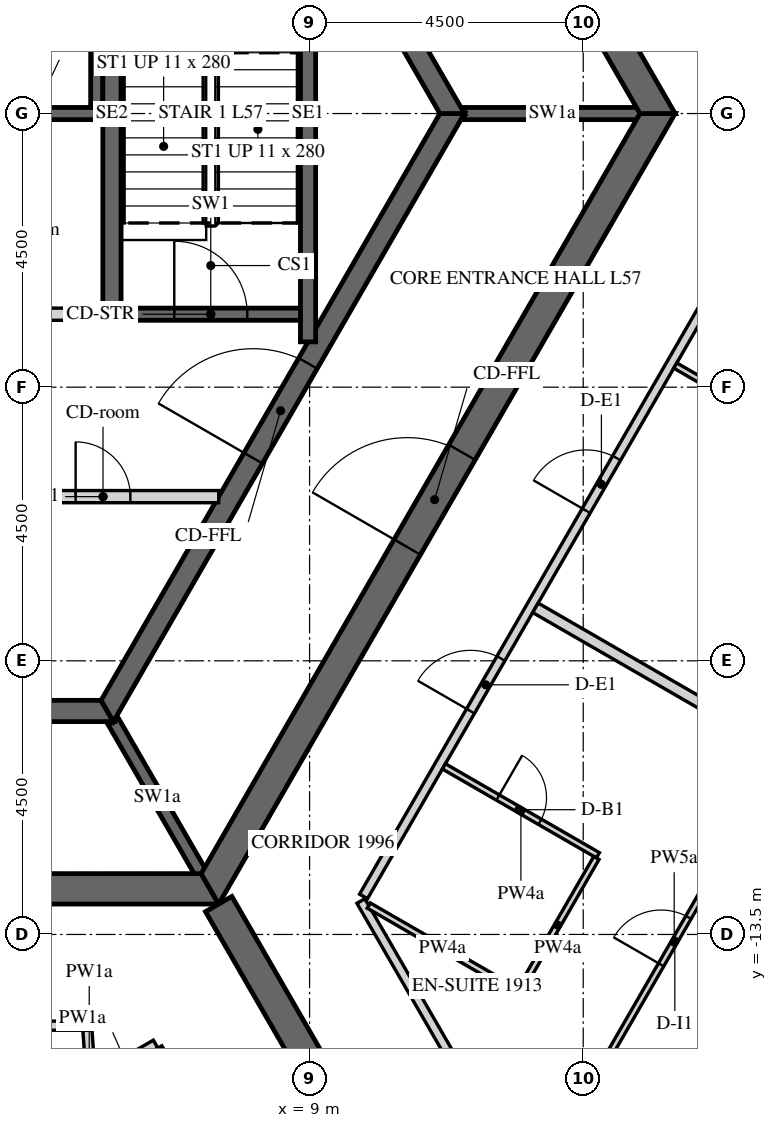
"""IFC4 building model, lengths in metres.
Left out: names, types, materials, properties, quantities, classifications, styles, units other than length and angle.
Written with IfcOpenShell. Run it as: python <this file> out.ifc"""

import sys

from ifc_helpers import new_model, si_unit, direction, frame, frame_2d, origin, place, context, subcontext, project, spatial, polyline, rectangle, outline, extrude, element, fill, save


model = new_model("IFC4")
c1 = context("Model", 3, precision=1e-05, world=origin(), true_north=direction((0.0, 1.0)))
c2 = subcontext(c1, "Body", "Model", "MODEL_VIEW")
j1 = project(units=[si_unit("LENGTHUNIT", "METRE"), si_unit("PLANEANGLEUNIT", "RADIAN")], contexts=[c1])
p1 = place(None, origin())
s1 = spatial("IfcSite", under=j1, at=p1, CompositionType="ELEMENT")
p2 = place(p1, origin())
s2 = spatial("IfcBuilding", under=s1, at=p2, CompositionType="ELEMENT")
p3 = place(p2, frame((0.0, 0.0, 238.5)))
s3 = spatial("IfcBuildingStorey", under=s2, at=p3, CompositionType="ELEMENT", Elevation=238.5)
p4 = place(p3, frame((-7.361, -12.75, -0.15), z_axis=(0.0, 0.0, 1.0), x_axis=(1.0, 0.0, 0.0)))
e1 = element("IfcWall", 1, at=p4, inside=s3, PredefinedType="SHEAR", context=c2, shape_type="SweptSolid", body=[
    extrude(outline(polyline([(-0.144, -0.25), (14.866, -0.25), (14.578, 0.25), (0.144, 0.25), (-0.144, -0.25)])), origin(), (0.0, 0.0, 1.0), 3.9),
])
p5 = place(p4, frame((6.761, 0.0, 0.15)))
e2 = element("IfcOpeningElement", 2, at=p5, cuts=e1, PredefinedType="OPENING", context=c2, shape_type="SweptSolid", body=[
    extrude(rectangle(XDim=1.2, YDim=2.4, at=frame_2d((0.6, 1.2))), frame((0.0, 0.26, 0.0), z_axis=(0.0, -1.0, 0.0), x_axis=(1.0, 0.0, 0.0)), (0.0, 0.0, 1.0), 0.52),
])
p6 = place(p3, frame((7.361, -12.75, -0.15), z_axis=(0.0, 0.0, 1.0), x_axis=(0.50000571537, 0.866022103989, 0.0)))
e3 = element("IfcWall", 3, at=p6, inside=s3, PredefinedType="SHEAR", context=c2, shape_type="SweptSolid", body=[
    extrude(outline(polyline([(-0.144, -0.25), (14.867, -0.25), (14.578, 0.25), (0.144, 0.25), (-0.144, -0.25)])), origin(), (0.0, 0.0, 1.0), 3.9),
])
p7 = place(p6, frame((6.49, 0.0, 0.15)))
e4 = element("IfcOpeningElement", 4, at=p7, cuts=e3, PredefinedType="OPENING", context=c2, shape_type="SweptSolid", body=[
    extrude(rectangle(XDim=1.8, YDim=2.4, at=frame_2d((0.9, 1.2))), frame((0.0, 0.26, 0.0), z_axis=(0.0, -1.0, 0.0), x_axis=(1.0, 0.0, 0.0)), (0.0, 0.0, 1.0), 0.52),
])
p8 = place(p3, frame((14.722, 0.0, -0.15), z_axis=(0.0, 0.0, 1.0), x_axis=(-0.50000571537, 0.866022103989, 0.0)))
e5 = element("IfcWall", 5, at=p8, inside=s3, PredefinedType="SHEAR", context=c2, shape_type="SweptSolid", body=[
    extrude(outline(polyline([(-0.144, -0.25), (14.867, -0.25), (14.578, 0.25), (0.144, 0.25), (-0.144, -0.25)])), origin(), (0.0, 0.0, 1.0), 3.9),
])
p9 = place(p8, frame((6.432, 0.0, 0.15)))
e6 = element("IfcOpeningElement", 6, at=p9, cuts=e5, PredefinedType="OPENING", context=c2, shape_type="SweptSolid", body=[
    extrude(rectangle(XDim=1.8, YDim=2.4, at=frame_2d((0.9, 1.2))), frame((0.0, 0.26, 0.0), z_axis=(0.0, -1.0, 0.0), x_axis=(1.0, 0.0, 0.0)), (0.0, 0.0, 1.0), 0.52),
])
p10 = place(p3, frame((7.506, -13.0, -0.15), z_axis=(0.0, 0.0, 1.0), x_axis=(0.499988271576, -0.866032175087, 0.0)))
e7 = element("IfcWall", 7, at=p10, inside=s3, PredefinedType="SHEAR", context=c2, shape_type="SweptSolid", body=[
    extrude(rectangle(XDim=15.424, YDim=0.5, at=frame_2d((7.712, 0.0))), origin(), (0.0, 0.0, 1.0), 3.9),
])
p11 = place(p10, frame((6.812, 0.0, 0.15)))
e8 = element("IfcOpeningElement", 8, at=p11, cuts=e7, PredefinedType="OPENING", context=c2, shape_type="SweptSolid", body=[
    extrude(rectangle(XDim=1.8, YDim=2.4, at=frame_2d((0.9, 1.2))), frame((0.0, 0.26, 0.0), z_axis=(0.0, -1.0, 0.0), x_axis=(1.0, 0.0, 0.0)), (0.0, 0.0, 1.0), 0.52),
])
p12 = place(p3, frame((-5.673, -9.825, -0.15), z_axis=(0.0, 0.0, 1.0), x_axis=(1.0, 0.0, 0.0)))
e9 = element("IfcWall", 9, at=p12, inside=s3, PredefinedType="SHEAR", context=c2, shape_type="SweptSolid", body=[
    extrude(outline(polyline([(-0.101, -0.175), (11.446, -0.175), (11.244, 0.175), (0.101, 0.175), (-0.101, -0.175)])), origin(), (0.0, 0.0, 1.0), 3.9),
])
p13 = place(p3, frame((5.673, -9.825, -0.15), z_axis=(0.0, 0.0, 1.0), x_axis=(0.499995046907, 0.866028263435, 0.0)))
e10 = element("IfcWall", 10, at=p13, inside=s3, PredefinedType="SHEAR", context=c2, shape_type="SweptSolid", body=[
    extrude(outline(polyline([(-0.101, -0.175), (11.446, -0.175), (11.244, 0.175), (0.101, 0.175), (-0.101, -0.175)])), origin(), (0.0, 0.0, 1.0), 3.9),
])
p14 = place(p13, frame((4.801, 0.0, 0.15)))
e11 = element("IfcOpeningElement", 11, at=p14, cuts=e10, PredefinedType="OPENING", context=c2, shape_type="SweptSolid", body=[
    extrude(rectangle(XDim=1.8, YDim=2.4, at=frame_2d((0.9, 1.2))), frame((0.0, 0.185, 0.0), z_axis=(0.0, -1.0, 0.0), x_axis=(1.0, 0.0, 0.0)), (0.0, 0.0, 1.0), 0.37),
])
p15 = place(p3, frame((11.345, 0.0, -0.15), z_axis=(0.0, 0.0, 1.0), x_axis=(-0.499995046907, 0.866028263435, 0.0)))
e12 = element("IfcWall", 12, at=p15, inside=s3, PredefinedType="SHEAR", context=c2, shape_type="SweptSolid", body=[
    extrude(outline(polyline([(-0.101, -0.175), (11.446, -0.175), (11.244, 0.175), (0.101, 0.175), (-0.101, -0.175)])), origin(), (0.0, 0.0, 1.0), 3.9),
])
p16 = place(p15, frame((4.744, 0.0, 0.15)))
e13 = element("IfcOpeningElement", 13, at=p16, cuts=e12, PredefinedType="OPENING", context=c2, shape_type="SweptSolid", body=[
    extrude(rectangle(XDim=1.8, YDim=2.4, at=frame_2d((0.9, 1.2))), frame((0.0, 0.185, 0.0), z_axis=(0.0, -1.0, 0.0), x_axis=(1.0, 0.0, 0.0)), (0.0, 0.0, 1.0), 0.37),
])
p17 = place(p3, frame((-5.6, 0.0, -0.25), z_axis=(0.0, 0.0, 1.0), x_axis=(1.0, 0.0, 0.0)))
e14 = element("IfcWall", 14, at=p17, inside=s3, PredefinedType="SHEAR", context=c2, shape_type="SweptSolid", body=[
    extrude(rectangle(XDim=11.2, YDim=0.2, at=frame_2d((5.6, 0.0))), origin(), (0.0, 0.0, 1.0), 3.9),
])
p18 = place(p3, frame((5.5, 0.1, -0.25), z_axis=(0.0, 0.0, 1.0), x_axis=(0.0, 1.0, 0.0)))
e15 = element("IfcWall", 15, at=p18, inside=s3, PredefinedType="SHEAR", context=c2, shape_type="SweptSolid", body=[
    extrude(rectangle(XDim=3.1, YDim=0.2, at=frame_2d((1.55, 0.0))), origin(), (0.0, 0.0, 1.0), 3.9),
])
p19 = place(p3, frame((2.75, -3.3, 0.0), z_axis=(0.0, 0.0, 1.0), x_axis=(1.0, 0.0, 0.0)))
e16 = element("IfcWall", 16, at=p19, inside=s3, PredefinedType="PARTITIONING", context=c2, shape_type="SweptSolid", body=[
    extrude(rectangle(XDim=2.85, YDim=0.2, at=frame_2d((1.425, 0.0))), origin(), (0.0, 0.0, 1.0), 3.65),
])
p20 = place(p19, frame((1.075, 0.0, 0.0)))
e17 = element("IfcOpeningElement", 17, at=p20, cuts=e16, PredefinedType="OPENING", context=c2, shape_type="SweptSolid", body=[
    extrude(rectangle(XDim=0.9, YDim=2.1, at=frame_2d((0.45, 1.05))), frame((0.0, 0.11, 0.0), z_axis=(0.0, -1.0, 0.0), x_axis=(1.0, 0.0, 0.0)), (0.0, 0.0, 1.0), 0.22),
])
p21 = place(p3, frame((3.7, -6.3, 0.0), z_axis=(0.0, 0.0, 1.0), x_axis=(1.0, 0.0, 0.0)))
e18 = element("IfcWall", 18, at=p21, inside=s3, PredefinedType="PARTITIONING", context=c2, shape_type="SweptSolid", body=[
    extrude(rectangle(XDim=3.806, YDim=0.2, at=frame_2d((1.903, 0.0))), origin(), (0.0, 0.0, 1.0), 3.65),
])
p22 = place(p21, frame((1.453, 0.0, 0.0)))
e19 = element("IfcOpeningElement", 19, at=p22, cuts=e18, PredefinedType="OPENING", context=c2, shape_type="SweptSolid", body=[
    extrude(rectangle(XDim=0.9, YDim=2.1, at=frame_2d((0.45, 1.05))), frame((0.0, 0.11, 0.0), z_axis=(0.0, -1.0, 0.0), x_axis=(1.0, 0.0, 0.0)), (0.0, 0.0, 1.0), 0.22),
])
for number, where, z_axis, x_axis in (
    (20, (11.547, 0.0, -0.15), (0.0, 0.0, 1.0), (1.0, 0.0, 0.0)),
    (21, (5.773, -10.0, -0.15), (0.0, 0.0, 1.0), (0.5, -0.866, 0.0)),
):
    element("IfcWall", number, at=place(p3, frame(where, z_axis=z_axis, x_axis=x_axis)), inside=s3, PredefinedType="SHEAR", context=c2, shape_type="SweptSolid", body=[
        extrude(rectangle(XDim=2.887, YDim=0.2, at=frame_2d((1.443, 0.0))), origin(), (0.0, 0.0, 1.0), 3.9),
    ])
p23 = place(p3, frame((5.75, -3.4, -0.25), z_axis=(0.0, 0.0, 1.0), x_axis=(0.0, 1.0, 0.0)))
e22 = element("IfcWall", 22, at=p23, inside=s3, PredefinedType="SHEAR", context=c2, shape_type="SweptSolid", body=[
    extrude(rectangle(XDim=6.8, YDim=0.3, at=frame_2d((3.4, 0.0))), origin(), (0.0, 0.0, 1.0), 3.9),
])
p24 = place(p3, frame((8.975, -3.755, -0.25), z_axis=(0.0, 0.0, 1.0), x_axis=(0.0, 1.0, 0.0)))
e23 = element("IfcWall", 23, at=p24, inside=s3, PredefinedType="SHEAR", context=c2, shape_type="SweptSolid", body=[
    extrude(rectangle(XDim=7.51, YDim=0.25, at=frame_2d((3.755, 0.0))), origin(), (0.0, 0.0, 1.0), 3.9),
])
p25 = place(p3, frame((5.9, -3.3, -0.25), z_axis=(0.0, 0.0, 1.0), x_axis=(1.0, 0.0, 0.0)))
e24 = element("IfcWall", 24, at=p25, inside=s3, PredefinedType="SHEAR", context=c2, shape_type="SweptSolid", body=[
    extrude(rectangle(XDim=2.95, YDim=0.2, at=frame_2d((1.475, 0.0))), origin(), (0.0, 0.0, 1.0), 3.9),
])
p26 = place(p25, frame((0.875, 0.0, 0.25)))
e25 = element("IfcOpeningElement", 25, at=p26, cuts=e24, PredefinedType="OPENING", context=c2, shape_type="SweptSolid", body=[
    extrude(rectangle(XDim=1.2, YDim=2.4, at=frame_2d((0.6, 1.2))), frame((0.0, 0.11, 0.0), z_axis=(0.0, -1.0, 0.0), x_axis=(1.0, 0.0, 0.0)), (0.0, 0.0, 1.0), 0.22),
])
p27 = place(p3, frame((-8.574, -15.0, 0.0), z_axis=(0.0, 0.0, 1.0), x_axis=(1.0, 0.0, 0.0)))
e26 = element("IfcWall", 26, at=p27, inside=s3, PredefinedType="PARTITIONING", context=c2, shape_type="SweptSolid", body=[
    extrude(rectangle(XDim=13.915, YDim=0.15, at=frame_2d((6.958, 0.0))), origin(), (0.0, 0.0, 1.0), 2.838),
])
p28 = place(p27, frame((1.001, 0.0, 0.0)))
e27 = element("IfcOpeningElement", 27, at=p28, cuts=e26, PredefinedType="OPENING", context=c2, shape_type="SweptSolid", body=[
    extrude(rectangle(XDim=1.0, YDim=2.1, at=frame_2d((0.5, 1.05))), frame((0.0, 0.085, 0.0), z_axis=(0.0, -1.0, 0.0), x_axis=(1.0, 0.0, 0.0)), (0.0, 0.0, 1.0), 0.17),
])
p29 = place(p27, frame((9.199, 0.0, 0.0)))
e28 = element("IfcOpeningElement", 28, at=p29, cuts=e26, PredefinedType="OPENING", context=c2, shape_type="SweptSolid", body=[
    extrude(rectangle(XDim=1.0, YDim=2.1, at=frame_2d((0.5, 1.05))), frame((0.0, 0.085, 0.0), z_axis=(0.0, -1.0, 0.0), x_axis=(1.0, 0.0, 0.0)), (0.0, 0.0, 1.0), 0.17),
])
p30 = place(p3, frame((5.347, -15.075, 0.0), z_axis=(0.0, 0.0, 1.0), x_axis=(0.069731635013, -0.997565786842, 0.0)))
e29 = element("IfcWall", 29, at=p30, inside=s3, PredefinedType="PARTITIONING", context=c2, shape_type="SweptSolid", body=[
    extrude(rectangle(XDim=0.847, YDim=0.15, at=frame_2d((0.424, 0.0))), origin(), (0.0, 0.0, 1.0), 2.838),
])
p31 = place(p3, frame((6.506, -15.368, 0.0), z_axis=(0.0, 0.0, 1.0), x_axis=(0.499995202058, -0.86602817386, 0.0)))
e30 = element("IfcWall", 30, at=p31, inside=s3, PredefinedType="PARTITIONING", context=c2, shape_type="SweptSolid", body=[
    extrude(rectangle(XDim=7.361, YDim=0.15, at=frame_2d((3.68, 0.0))), origin(), (0.0, 0.0, 1.0), 2.838),
])
p32 = place(p31, frame((4.368, 0.0, 0.0)))
e31 = element("IfcOpeningElement", 31, at=p32, cuts=e30, PredefinedType="OPENING", context=c2, shape_type="SweptSolid", body=[
    extrude(rectangle(XDim=1.0, YDim=2.1, at=frame_2d((0.5, 1.05))), frame((0.0, 0.085, 0.0), z_axis=(0.0, -1.0, 0.0), x_axis=(1.0, 0.0, 0.0)), (0.0, 0.0, 1.0), 0.17),
])
p33 = place(p3, frame((5.478, -15.875, 0.0), z_axis=(0.0, 0.0, 1.0), x_axis=(0.866000689289, 0.500042804318, 0.0)))
e32 = element("IfcWall", 32, at=p33, inside=s3, PredefinedType="PARTITIONING", context=c2, shape_type="SweptSolid", body=[
    extrude(rectangle(XDim=1.144, YDim=0.15, at=frame_2d((0.572, 0.0))), origin(), (0.0, 0.0, 1.0), 2.838),
])
p34 = place(p3, frame((13.699, -19.628, 0.0), z_axis=(0.0, 0.0, 1.0), x_axis=(-0.499993780622, 0.866028994514, 0.0)))
e33 = element("IfcWall", 33, at=p34, inside=s3, PredefinedType="PARTITIONING", context=c2, shape_type="SweptSolid", body=[
    extrude(rectangle(XDim=7.711, YDim=0.15, at=frame_2d((3.855, 0.0))), origin(), (0.0, 0.0, 1.0), 2.838),
])
p35 = place(p3, frame((9.887, -12.875, 0.0), z_axis=(0.0, 0.0, 1.0), x_axis=(0.499998228944, 0.866026426302, 0.0)))
e34 = element("IfcWall", 34, at=p35, inside=s3, PredefinedType="PARTITIONING", context=c2, shape_type="SweptSolid", body=[
    extrude(rectangle(XDim=14.867, YDim=0.15, at=frame_2d((7.433, 0.0))), origin(), (0.0, 0.0, 1.0), 2.838),
])
p36 = place(p35, frame((3.519, 0.0, 0.0)))
e35 = element("IfcOpeningElement", 35, at=p36, cuts=e34, PredefinedType="OPENING", context=c2, shape_type="SweptSolid", body=[
    extrude(rectangle(XDim=1.0, YDim=2.1, at=frame_2d((0.5, 1.05))), frame((0.0, 0.085, 0.0), z_axis=(0.0, -1.0, 0.0), x_axis=(1.0, 0.0, 0.0)), (0.0, 0.0, 1.0), 0.17),
])
p37 = place(p35, frame((7.324, 0.0, 0.0)))
e36 = element("IfcOpeningElement", 36, at=p37, cuts=e34, PredefinedType="OPENING", context=c2, shape_type="SweptSolid", body=[
    extrude(rectangle(XDim=1.0, YDim=2.1, at=frame_2d((0.5, 1.05))), frame((0.0, 0.085, 0.0), z_axis=(0.0, -1.0, 0.0), x_axis=(1.0, 0.0, 0.0)), (0.0, 0.0, 1.0), 0.17),
])
p38 = place(p35, frame((13.717, 0.0, 0.0)))
e37 = element("IfcOpeningElement", 37, at=p38, cuts=e34, PredefinedType="OPENING", context=c2, shape_type="SweptSolid", body=[
    extrude(rectangle(XDim=1.0, YDim=2.1, at=frame_2d((0.5, 1.05))), frame((0.0, 0.085, 0.0), z_axis=(0.0, -1.0, 0.0), x_axis=(1.0, 0.0, 0.0)), (0.0, 0.0, 1.0), 0.17),
])
p39 = place(p3, frame((17.277, 0.075, 0.0), z_axis=(0.0, 0.0, 1.0), x_axis=(-0.499998228944, 0.866026426302, 0.0)))
e38 = element("IfcWall", 38, at=p39, inside=s3, PredefinedType="PARTITIONING", context=c2, shape_type="SweptSolid", body=[
    extrude(rectangle(XDim=14.867, YDim=0.15, at=frame_2d((7.433, 0.0))), origin(), (0.0, 0.0, 1.0), 2.838),
])
p40 = place(p39, frame((4.345, 0.0, 0.0)))
e39 = element("IfcOpeningElement", 39, at=p40, cuts=e38, PredefinedType="OPENING", context=c2, shape_type="SweptSolid", body=[
    extrude(rectangle(XDim=1.0, YDim=2.1, at=frame_2d((0.5, 1.05))), frame((0.0, 0.085, 0.0), z_axis=(0.0, -1.0, 0.0), x_axis=(1.0, 0.0, 0.0)), (0.0, 0.0, 1.0), 0.17),
])
p41 = place(p39, frame((8.51, 0.0, 0.0)))
e40 = element("IfcOpeningElement", 40, at=p41, cuts=e38, PredefinedType="OPENING", context=c2, shape_type="SweptSolid", body=[
    extrude(rectangle(XDim=1.0, YDim=2.1, at=frame_2d((0.5, 1.05))), frame((0.0, 0.085, 0.0), z_axis=(0.0, -1.0, 0.0), x_axis=(1.0, 0.0, 0.0)), (0.0, 0.0, 1.0), 0.17),
])
p42 = place(p3, frame((11.209, -10.736, 0.0), z_axis=(0.0, 0.0, 1.0), x_axis=(0.866046596414, -0.499963291492, 0.0)))
e41 = element("IfcWall", 41, at=p42, inside=s3, PredefinedType="PARTITIONING", context=c2, shape_type="SweptSolid", body=[
    extrude(rectangle(XDim=2.925, YDim=0.1, at=frame_2d((1.462, 0.0))), origin(), (0.0, 0.0, 1.0), 2.838),
])
p43 = place(p42, frame((1.025, 0.0, 0.0)))
e42 = element("IfcOpeningElement", 42, at=p43, cuts=e41, PredefinedType="OPENING", context=c2, shape_type="SweptSolid", body=[
    extrude(rectangle(XDim=0.8, YDim=2.1, at=frame_2d((0.4, 1.05))), frame((0.0, 0.06, 0.0), z_axis=(0.0, -1.0, 0.0), x_axis=(1.0, 0.0, 0.0)), (0.0, 0.0, 1.0), 0.12),
])
p44 = place(p3, frame((13.717, -12.242, 0.0), z_axis=(0.0, 0.0, 1.0), x_axis=(-0.499990435942, -0.866030925526, 0.0)))
e43 = element("IfcWall", 43, at=p44, inside=s3, PredefinedType="PARTITIONING", context=c2, shape_type="SweptSolid", body=[
    extrude(rectangle(XDim=2.55, YDim=0.1, at=frame_2d((1.275, 0.0))), origin(), (0.0, 0.0, 1.0), 2.838),
])
p45 = place(p3, frame((12.399, -14.425, 0.0), z_axis=(0.0, 0.0, 1.0), x_axis=(-0.866018616679, 0.500011755427, 0.0)))
e44 = element("IfcWall", 44, at=p45, inside=s3, PredefinedType="PARTITIONING", context=c2, shape_type="SweptSolid", body=[
    extrude(rectangle(XDim=2.8, YDim=0.1, at=frame_2d((1.4, 0.0))), origin(), (0.0, 0.0, 1.0), 2.838),
])
p46 = place(p3, frame((13.231, -16.683, 0.0), z_axis=(0.0, 0.0, 1.0), x_axis=(0.499995846692, 0.866027801685, 0.0)))
e45 = element("IfcWall", 45, at=p46, inside=s3, PredefinedType="PARTITIONING", context=c2, shape_type="SweptSolid", body=[
    extrude(rectangle(XDim=7.06, YDim=0.1, at=frame_2d((3.53, 0.0))), origin(), (0.0, 0.0, 1.0), 2.838),
])
p47 = place(p46, frame((3.1, 0.0, 0.0)))
e46 = element("IfcOpeningElement", 46, at=p47, cuts=e45, PredefinedType="OPENING", context=c2, shape_type="SweptSolid", body=[
    extrude(rectangle(XDim=0.9, YDim=2.1, at=frame_2d((0.45, 1.05))), frame((0.0, 0.06, 0.0), z_axis=(0.0, -1.0, 0.0), x_axis=(1.0, 0.0, 0.0)), (0.0, 0.0, 1.0), 0.12),
])
p48 = place(p3, frame((23.431, -14.316, 0.0), z_axis=(0.0, 0.0, 1.0), x_axis=(-0.866024931941, 0.500000817256, 0.0)))
e47 = element("IfcWall", 47, at=p48, inside=s3, PredefinedType="PARTITIONING", context=c2, shape_type="SweptSolid", body=[
    extrude(rectangle(XDim=12.375, YDim=0.18, at=frame_2d((6.188, 0.0))), origin(), (0.0, 0.0, 1.0), 2.838),
])
p49 = place(p3, frame((17.158, -5.382, 0.0), z_axis=(0.0, 0.0, 1.0), x_axis=(-0.866031185235, 0.4999899861, 0.0)))
e48 = element("IfcWall", 48, at=p49, inside=s3, PredefinedType="PARTITIONING", context=c2, shape_type="SweptSolid", body=[
    extrude(rectangle(XDim=2.475, YDim=0.1, at=frame_2d((1.238, 0.0))), origin(), (0.0, 0.0, 1.0), 2.838),
])
p50 = place(p49, frame((0.85, 0.0, 0.0)))
e49 = element("IfcOpeningElement", 49, at=p50, cuts=e48, PredefinedType="OPENING", context=c2, shape_type="SweptSolid", body=[
    extrude(rectangle(XDim=0.8, YDim=2.1, at=frame_2d((0.4, 1.05))), frame((0.0, 0.06, 0.0), z_axis=(0.0, -1.0, 0.0), x_axis=(1.0, 0.0, 0.0)), (0.0, 0.0, 1.0), 0.12),
])
p51 = place(p7, origin())
e50 = element("IfcDoor", 50, at=p51, inside=s3, OperationType="DOUBLE_DOOR_SINGLE_SWING", PredefinedType="DOOR", context=c2, shape_type="SweptSolid", body=[
    extrude(rectangle(XDim=1.8, YDim=2.4, at=frame_2d((0.9, 1.2))), frame((0.0, 0.025, 0.0), z_axis=(0.0, -1.0, 0.0), x_axis=(1.0, 0.0, 0.0)), (0.0, 0.0, 1.0), 0.05),
])
fill(e4, e50)
p52 = place(p14, origin())
e51 = element("IfcDoor", 51, at=p52, inside=s3, OperationType="DOUBLE_DOOR_SINGLE_SWING", PredefinedType="DOOR", context=c2, shape_type="SweptSolid", body=[
    extrude(rectangle(XDim=1.8, YDim=2.4, at=frame_2d((0.9, 1.2))), frame((0.0, 0.025, 0.0), z_axis=(0.0, -1.0, 0.0), x_axis=(1.0, 0.0, 0.0)), (0.0, 0.0, 1.0), 0.05),
])
fill(e11, e51)
p53 = place(p22, origin())
e52 = element("IfcDoor", 52, at=p53, inside=s3, OperationType="SINGLE_SWING_LEFT", PredefinedType="DOOR", context=c2, shape_type="SweptSolid", body=[
    extrude(rectangle(XDim=0.9, YDim=2.1, at=frame_2d((0.45, 1.05))), frame((0.0, 0.025, 0.0), z_axis=(0.0, -1.0, 0.0), x_axis=(1.0, 0.0, 0.0)), (0.0, 0.0, 1.0), 0.05),
])
fill(e19, e52)
p54 = place(p26, origin())
e53 = element("IfcDoor", 53, at=p54, inside=s3, OperationType="SINGLE_SWING_LEFT", PredefinedType="DOOR", context=c2, shape_type="SweptSolid", body=[
    extrude(rectangle(XDim=1.2, YDim=2.4, at=frame_2d((0.6, 1.2))), frame((0.0, 0.025, 0.0), z_axis=(0.0, -1.0, 0.0), x_axis=(1.0, 0.0, 0.0)), (0.0, 0.0, 1.0), 0.05),
])
fill(e25, e53)
p55 = place(p36, origin())
e54 = element("IfcDoor", 54, at=p55, inside=s3, OperationType="SINGLE_SWING_RIGHT", PredefinedType="DOOR", context=c2, shape_type="SweptSolid", body=[
    extrude(rectangle(XDim=1.0, YDim=2.1, at=frame_2d((0.5, 1.05))), frame((0.0, 0.025, 0.0), z_axis=(0.0, -1.0, 0.0), x_axis=(1.0, 0.0, 0.0)), (0.0, 0.0, 1.0), 0.05),
])
fill(e35, e54)
p56 = place(p43, origin())
e55 = element("IfcDoor", 55, at=p56, inside=s3, OperationType="SINGLE_SWING_RIGHT", PredefinedType="DOOR", context=c2, shape_type="SweptSolid", body=[
    extrude(rectangle(XDim=0.8, YDim=2.1, at=frame_2d((0.4, 1.05))), frame((0.0, 0.025, 0.0), z_axis=(0.0, -1.0, 0.0), x_axis=(1.0, 0.0, 0.0)), (0.0, 0.0, 1.0), 0.05),
])
fill(e42, e55)
p57 = place(p47, origin())
e56 = element("IfcDoor", 56, at=p57, inside=s3, OperationType="SINGLE_SWING_LEFT", PredefinedType="DOOR", context=c2, shape_type="SweptSolid", body=[
    extrude(rectangle(XDim=0.9, YDim=2.1, at=frame_2d((0.45, 1.05))), frame((0.0, 0.025, 0.0), z_axis=(0.0, -1.0, 0.0), x_axis=(1.0, 0.0, 0.0)), (0.0, 0.0, 1.0), 0.05),
])
fill(e46, e56)
p58 = place(p37, origin())
e57 = element("IfcDoor", 57, at=p58, inside=s3, OperationType="SINGLE_SWING_LEFT", PredefinedType="DOOR", context=c2, shape_type="SweptSolid", body=[
    extrude(rectangle(XDim=1.0, YDim=2.1, at=frame_2d((0.5, 1.05))), frame((0.0, 0.025, 0.0), z_axis=(0.0, -1.0, 0.0), x_axis=(1.0, 0.0, 0.0)), (0.0, 0.0, 1.0), 0.05),
])
fill(e36, e57)
save(model, sys.argv[1])
